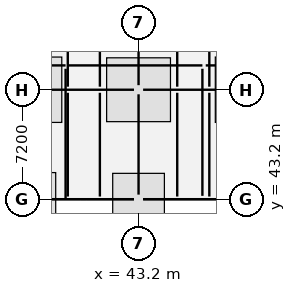
"""IFC4 building model, lengths in metres.
Left out: names, types, materials, properties, quantities, classifications, styles, units other than length and angle.
Written with IfcOpenShell. Run it as: python <this file> out.ifc"""

import sys

from ifc_helpers import new_model, si_unit, direction, frame, frame_2d, origin, origin_2d, place, context, subcontext, project, spatial, rectangle, extrude, element, fill, save


model = new_model("IFC4")
c1 = context("Model", 3, precision=1e-05, world=origin(), true_north=direction((0.0, 1.0)))
c2 = subcontext(c1, "Body", "Model", "MODEL_VIEW")
j1 = project(units=[si_unit("LENGTHUNIT", "METRE"), si_unit("PLANEANGLEUNIT", "RADIAN")], contexts=[c1])
p1 = place(None, origin())
s1 = spatial("IfcSite", under=j1, at=p1, CompositionType="ELEMENT")
p2 = place(p1, origin())
s2 = spatial("IfcBuilding", under=s1, at=p2, CompositionType="ELEMENT")
p3 = place(p2, origin())
s3 = spatial("IfcBuildingStorey", under=s2, at=p3, CompositionType="ELEMENT", Elevation=0.0)
for number, where, z_axis, x_axis in (
    (1, (43.2, 43.2, 0.0), (0.0, 0.0, 1.0), (1.0, 0.0, 0.0)),
    (2, (43.2, 50.4, 0.0), (0.0, 0.0, 1.0), (1.0, 0.0, 0.0)),
):
    element("IfcColumn", number, at=place(p3, frame(where, z_axis=z_axis, x_axis=x_axis)), inside=s3, PredefinedType="COLUMN", context=c2, shape_type="SweptSolid", body=[
        extrude(rectangle(XDim=0.6, YDim=0.6, at=origin_2d()), origin(), (0.0, 0.0, 1.0), 5.4),
    ])
p4 = place(p3, frame((50.1, 43.2, 0.0), z_axis=(0.0, 0.0, 1.0), x_axis=(-1.0, 0.0, 0.0)))
e3 = element("IfcWall", 3, at=p4, inside=s3, PredefinedType="ELEMENTEDWALL", context=c2, shape_type="SweptSolid", body=[
    extrude(rectangle(XDim=6.6, YDim=0.32, at=frame_2d((3.3, 0.0))), origin(), (0.0, 0.0, 1.0), 4.49),
])
p5 = place(p3, frame((39.8, 43.2, 0.0), z_axis=(0.0, 0.0, 1.0), x_axis=(-1.0, 0.0, 0.0)))
e4 = element("IfcWall", 4, at=p5, inside=s3, PredefinedType="SOLIDWALL", context=c2, shape_type="SweptSolid", body=[
    extrude(rectangle(XDim=0.4, YDim=0.36, at=frame_2d((0.2, 0.0))), origin(), (0.0, 0.0, 1.0), 4.49),
])
p6 = place(p3, frame((28.996, 52.0, 0.0), z_axis=(0.0, 0.0, 1.0), x_axis=(1.0, 0.0, 0.0)))
e5 = element("IfcWall", 5, at=p6, inside=s3, PredefinedType="PLUMBINGWALL", context=c2, shape_type="SweptSolid", body=[
    extrude(rectangle(XDim=9.404, YDim=0.18, at=frame_2d((4.702, 0.0))), origin(), (0.0, 0.0, 1.0), 4.488),
])
p7 = place(p6, frame((4.202, 0.0, 0.0)))
e6 = element("IfcOpeningElement", 6, at=p7, cuts=e5, PredefinedType="OPENING", context=c2, shape_type="SweptSolid", body=[
    extrude(rectangle(XDim=1.0, YDim=2.15, at=frame_2d((0.5, 1.075))), frame((0.0, 0.102, 0.0), z_axis=(0.0, -1.0, 0.0), x_axis=(1.0, 0.0, 0.0)), (0.0, 0.0, 1.0), 0.204),
])
p8 = place(p3, frame((38.4, 43.2, 0.0), z_axis=(0.0, 0.0, 1.0), x_axis=(0.0, 1.0, 0.0)))
e7 = element("IfcWall", 7, at=p8, inside=s3, PredefinedType="PLUMBINGWALL", context=c2, shape_type="SweptSolid", body=[
    extrude(rectangle(XDim=8.58, YDim=0.18, at=frame_2d((4.29, 0.0))), origin(), (0.0, 0.0, 1.0), 4.388),
])
p9 = place(p3, frame((38.62, 52.0, 0.0), z_axis=(0.0, 0.0, 1.0), x_axis=(1.0, 0.0, 0.0)))
e8 = element("IfcWall", 8, at=p9, inside=s3, PredefinedType="PLUMBINGWALL", context=c2, shape_type="SweptSolid", body=[
    extrude(rectangle(XDim=8.78, YDim=0.18, at=frame_2d((4.39, 0.0))), origin(), (0.0, 0.0, 1.0), 4.488),
])
p10 = place(p9, frame((3.19, 0.0, 0.0)))
e9 = element("IfcOpeningElement", 9, at=p10, cuts=e8, PredefinedType="OPENING", context=c2, shape_type="SweptSolid", body=[
    extrude(rectangle(XDim=0.9, YDim=2.1, at=frame_2d((0.45, 1.05))), frame((0.0, 0.102, 0.0), z_axis=(0.0, -1.0, 0.0), x_axis=(1.0, 0.0, 0.0)), (0.0, 0.0, 1.0), 0.204),
])
p11 = place(p3, frame((47.4, 43.42, 0.0), z_axis=(0.0, 0.0, 1.0), x_axis=(0.0, 1.0, 0.0)))
e10 = element("IfcWall", 10, at=p11, inside=s3, PredefinedType="PLUMBINGWALL", context=c2, shape_type="SweptSolid", body=[
    extrude(rectangle(XDim=8.36, YDim=0.18, at=frame_2d((4.18, 0.0))), origin(), (0.0, 0.0, 1.0), 4.438),
])
p12 = place(p3, frame((47.62, 52.0, 0.0), z_axis=(0.0, 0.0, 1.0), x_axis=(1.0, 0.0, 0.0)))
e11 = element("IfcWall", 11, at=p12, inside=s3, PredefinedType="PARTITIONING", context=c2, shape_type="SweptSolid", body=[
    extrude(rectangle(XDim=8.86, YDim=0.1, at=frame_2d((4.43, 0.0))), origin(), (0.0, 0.0, 1.0), 4.488),
])
p13 = place(p12, frame((3.93, 0.0, 0.0)))
e12 = element("IfcOpeningElement", 12, at=p13, cuts=e11, PredefinedType="OPENING", context=c2, shape_type="SweptSolid", body=[
    extrude(rectangle(XDim=1.0, YDim=2.15, at=frame_2d((0.5, 1.075))), frame((0.0, 0.062, 0.0), z_axis=(0.0, -1.0, 0.0), x_axis=(1.0, 0.0, 0.0)), (0.0, 0.0, 1.0), 0.124),
])
p14 = place(p10, origin())
e13 = element("IfcDoor", 13, at=p14, inside=s3, OperationType="SINGLE_SWING_LEFT", PredefinedType="DOOR", context=c2, shape_type="SweptSolid", body=[
    extrude(rectangle(XDim=0.9, YDim=2.1, at=frame_2d((0.45, 1.05))), frame((0.0, 0.025, 0.0), z_axis=(0.0, -1.0, 0.0), x_axis=(1.0, 0.0, 0.0)), (0.0, 0.0, 1.0), 0.05),
])
fill(e9, e13)
save(model, sys.argv[1])
